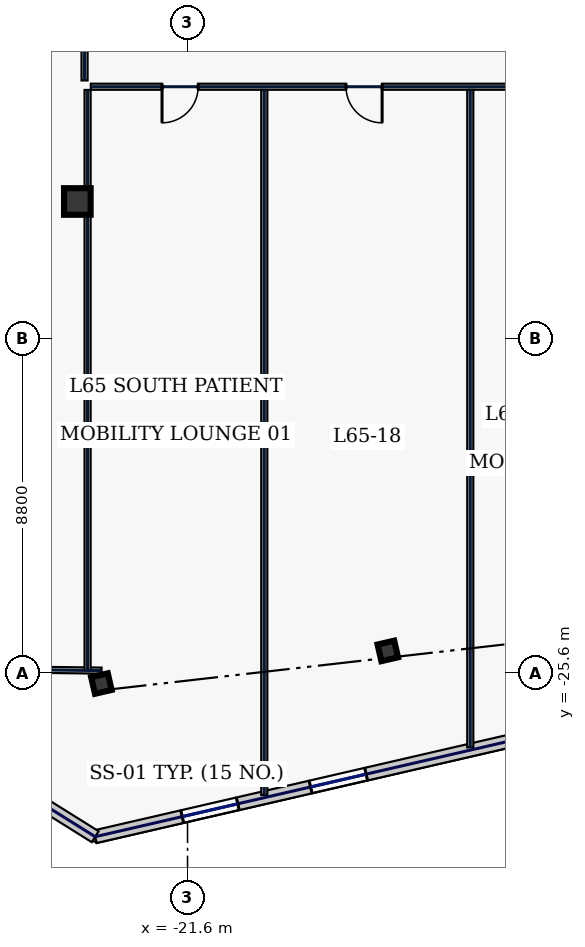
"""IFC4 building model, lengths in metres.
Left out: names, types, materials, properties, quantities, classifications, styles, units other than length and angle.
Written with IfcOpenShell. Run it as: python <this file> out.ifc"""

import sys

from ifc_helpers import new_model, si_unit, direction, frame, frame_2d, origin, origin_2d, place, context, subcontext, project, spatial, rectangle, hollow_rectangle, extrude, element, fill, save


model = new_model("IFC4")
c1 = context("Model", 3, precision=1e-05, world=origin(), true_north=direction((0.0, 1.0)))
c2 = subcontext(c1, "Body", "Model", "MODEL_VIEW")
j1 = project(units=[si_unit("LENGTHUNIT", "METRE"), si_unit("PLANEANGLEUNIT", "RADIAN")], contexts=[c1])
p1 = place(None, origin())
s1 = spatial("IfcSite", under=j1, at=p1, CompositionType="ELEMENT")
p2 = place(p1, origin())
s2 = spatial("IfcBuilding", under=s1, at=p2, CompositionType="ELEMENT")
p3 = place(p2, frame((0.0, 0.0, 281.0)))
s3 = spatial("IfcBuildingStorey", under=s2, at=p3, CompositionType="ELEMENT", Elevation=281.0)
p4 = place(p3, frame((-24.5, -13.2, 0.0), z_axis=(0.0, 0.0, 1.0), x_axis=(1.0, 0.0, 0.0)))
e1 = element("IfcColumn", 1, at=p4, inside=s3, PredefinedType="COLUMN", context=c2, shape_type="SweptSolid", body=[
    extrude(hollow_rectangle(XDim=0.7, YDim=0.7, WallThickness=0.032, at=origin_2d()), origin(), (0.0, 0.0, 1.0), 3.74),
])
for number, where, z_axis, x_axis in (
    (2, (-23.867, -25.886, 0.0), (0.0, 0.0, 1.0), (0.974, 0.225, 0.0)),
    (3, (-16.33, -25.027, 0.0), (0.0, 0.0, 1.0), (0.974, 0.225, 0.0)),
):
    element("IfcColumn", number, at=place(p3, frame(where, z_axis=z_axis, x_axis=x_axis)), inside=s3, PredefinedType="COLUMN", context=c2, shape_type="SweptSolid", body=[
        extrude(hollow_rectangle(XDim=0.45, YDim=0.45, WallThickness=0.022, at=origin_2d()), origin(), (0.0, 0.0, 1.0), 3.74),
    ])
p5 = place(p3, frame((-24.03, -29.916, 0.0), z_axis=(0.0, 0.0, 1.0), x_axis=(0.974371201193, 0.224946131964, 0.0)))
e4 = element("IfcWall", 4, at=p5, inside=s3, PredefinedType="STANDARD", context=c2, shape_type="SweptSolid", body=[
    extrude(rectangle(XDim=12.35, YDim=0.34, at=frame_2d((6.175, 0.0))), origin(), (0.0, 0.0, 1.0), 3.74),
])
p6 = place(p5, frame((2.35, 0.0, 0.9)))
e5 = element("IfcOpeningElement", 5, at=p6, cuts=e4, PredefinedType="OPENING", context=c2, shape_type="SweptSolid", body=[
    extrude(rectangle(XDim=1.5, YDim=2.0, at=frame_2d((0.75, 1.0))), frame((0.0, 0.18, 0.0), z_axis=(0.0, -1.0, 0.0), x_axis=(1.0, 0.0, 0.0)), (0.0, 0.0, 1.0), 0.36),
])
p7 = place(p5, frame((5.817, 0.0, 0.9)))
e6 = element("IfcOpeningElement", 6, at=p7, cuts=e4, PredefinedType="OPENING", context=c2, shape_type="SweptSolid", body=[
    extrude(rectangle(XDim=1.5, YDim=2.0, at=frame_2d((0.75, 1.0))), frame((0.0, 0.18, 0.0), z_axis=(0.0, -1.0, 0.0), x_axis=(1.0, 0.0, 0.0)), (0.0, 0.0, 1.0), 0.36),
])
p8 = place(p3, frame((-29.343, -26.596, 0.0), z_axis=(0.0, 0.0, 1.0), x_axis=(0.848037708252, -0.529935887993, 0.0)))
e7 = element("IfcWall", 7, at=p8, inside=s3, PredefinedType="STANDARD", context=c2, shape_type="SweptSolid", body=[
    extrude(rectangle(XDim=6.265, YDim=0.34, at=frame_2d((3.133, 0.0))), origin(), (0.0, 0.0, 1.0), 3.74),
])
p9 = place(p3, frame((-28.994, -25.479, 0.0), z_axis=(0.0, 0.0, 1.0), x_axis=(0.999915052546, -0.01303409726, 0.0)))
e8 = element("IfcWall", 8, at=p9, inside=s3, PredefinedType="PARTITIONING", context=c2, shape_type="SweptSolid", body=[
    extrude(rectangle(XDim=5.132, YDim=0.16, at=frame_2d((2.566, 0.0))), origin(), (0.0, 0.0, 1.0), 3.74),
])
p10 = place(p3, frame((-24.31, -10.015, 0.0), z_axis=(0.0, 0.0, 1.0), x_axis=(0.0, 1.0, 0.0)))
e9 = element("IfcWall", 9, at=p10, inside=s3, PredefinedType="PARTITIONING", context=c2, shape_type="SweptSolid", body=[
    extrude(rectangle(XDim=20.13, YDim=0.16, at=frame_2d((10.065, 0.0))), origin(), (0.0, 0.0, 1.0), 3.74),
])
p11 = place(p10, frame((2.169, 0.0, 0.0)))
e10 = element("IfcOpeningElement", 10, at=p11, cuts=e9, PredefinedType="OPENING", context=c2, shape_type="SweptSolid", body=[
    extrude(rectangle(XDim=0.95, YDim=2.2, at=frame_2d((0.475, 1.1))), frame((0.0, 0.09, 0.0), z_axis=(0.0, -1.0, 0.0), x_axis=(1.0, 0.0, 0.0)), (0.0, 0.0, 1.0), 0.18),
])
p12 = place(p10, frame((6.4, 0.0, 0.0)))
e11 = element("IfcOpeningElement", 11, at=p12, cuts=e9, PredefinedType="OPENING", context=c2, shape_type="SweptSolid", body=[
    extrude(rectangle(XDim=0.95, YDim=2.2, at=frame_2d((0.475, 1.1))), frame((0.0, 0.09, 0.0), z_axis=(0.0, -1.0, 0.0), x_axis=(1.0, 0.0, 0.0)), (0.0, 0.0, 1.0), 0.18),
])
p13 = place(p10, frame((11.6, 0.0, 0.0)))
e12 = element("IfcOpeningElement", 12, at=p13, cuts=e9, PredefinedType="OPENING", context=c2, shape_type="SweptSolid", body=[
    extrude(rectangle(XDim=0.95, YDim=2.2, at=frame_2d((0.475, 1.1))), frame((0.0, 0.09, 0.0), z_axis=(0.0, -1.0, 0.0), x_axis=(1.0, 0.0, 0.0)), (0.0, 0.0, 1.0), 0.18),
])
p14 = place(p10, frame((17.131, 0.0, 0.0)))
e13 = element("IfcOpeningElement", 13, at=p14, cuts=e9, PredefinedType="OPENING", context=c2, shape_type="SweptSolid", body=[
    extrude(rectangle(XDim=0.95, YDim=2.2, at=frame_2d((0.475, 1.1))), frame((0.0, 0.09, 0.0), z_axis=(0.0, -1.0, 0.0), x_axis=(1.0, 0.0, 0.0)), (0.0, 0.0, 1.0), 0.18),
])
p15 = place(p3, frame((12.535, -10.18, 0.0), z_axis=(0.0, 0.0, 1.0), x_axis=(-1.0, 0.0, 0.0)))
e14 = element("IfcWall", 14, at=p15, inside=s3, PredefinedType="PARTITIONING", context=c2, shape_type="SweptSolid", body=[
    extrude(rectangle(XDim=36.68, YDim=0.16, at=frame_2d((18.34, 0.0))), origin(), (0.0, 0.0, 1.0), 3.74),
])
p16 = place(p15, frame((33.856, 0.0, 0.0)))
e15 = element("IfcOpeningElement", 15, at=p16, cuts=e14, PredefinedType="OPENING", context=c2, shape_type="SweptSolid", body=[
    extrude(rectangle(XDim=0.95, YDim=2.2, at=frame_2d((0.475, 1.1))), frame((0.0, 0.09, 0.0), z_axis=(0.0, -1.0, 0.0), x_axis=(1.0, 0.0, 0.0)), (0.0, 0.0, 1.0), 0.18),
])
p17 = place(p15, frame((29.015, 0.0, 0.0)))
e16 = element("IfcOpeningElement", 16, at=p17, cuts=e14, PredefinedType="OPENING", context=c2, shape_type="SweptSolid", body=[
    extrude(rectangle(XDim=0.95, YDim=2.2, at=frame_2d((0.475, 1.1))), frame((0.0, 0.09, 0.0), z_axis=(0.0, -1.0, 0.0), x_axis=(1.0, 0.0, 0.0)), (0.0, 0.0, 1.0), 0.18),
])
p18 = place(p15, frame((23.83, 0.0, 0.0)))
e17 = element("IfcOpeningElement", 17, at=p18, cuts=e14, PredefinedType="OPENING", context=c2, shape_type="SweptSolid", body=[
    extrude(rectangle(XDim=0.95, YDim=2.2, at=frame_2d((0.475, 1.1))), frame((0.0, 0.09, 0.0), z_axis=(0.0, -1.0, 0.0), x_axis=(1.0, 0.0, 0.0)), (0.0, 0.0, 1.0), 0.18),
])
p19 = place(p15, frame((17.751, 0.0, 0.0)))
e18 = element("IfcOpeningElement", 18, at=p19, cuts=e14, PredefinedType="OPENING", context=c2, shape_type="SweptSolid", body=[
    extrude(rectangle(XDim=1.15, YDim=2.2, at=frame_2d((0.575, 1.1))), frame((0.0, 0.09, 0.0), z_axis=(0.0, -1.0, 0.0), x_axis=(1.0, 0.0, 0.0)), (0.0, 0.0, 1.0), 0.18),
])
p20 = place(p15, frame((12.426, 0.0, 0.0)))
e19 = element("IfcOpeningElement", 19, at=p20, cuts=e14, PredefinedType="OPENING", context=c2, shape_type="SweptSolid", body=[
    extrude(rectangle(XDim=1.05, YDim=2.2, at=frame_2d((0.525, 1.1))), frame((0.0, 0.09, 0.0), z_axis=(0.0, -1.0, 0.0), x_axis=(1.0, 0.0, 0.0)), (0.0, 0.0, 1.0), 0.18),
])
p21 = place(p15, frame((5.545, 0.0, 0.0)))
e20 = element("IfcOpeningElement", 20, at=p21, cuts=e14, PredefinedType="OPENING", context=c2, shape_type="SweptSolid", body=[
    extrude(rectangle(XDim=0.95, YDim=2.2, at=frame_2d((0.475, 1.1))), frame((0.0, 0.09, 0.0), z_axis=(0.0, -1.0, 0.0), x_axis=(1.0, 0.0, 0.0)), (0.0, 0.0, 1.0), 0.18),
])
p22 = place(p3, frame((-24.23, -25.536, 0.0), z_axis=(0.0, 0.0, 1.0), x_axis=(0.0, 1.0, 0.0)))
e21 = element("IfcWall", 21, at=p22, inside=s3, PredefinedType="PARTITIONING", context=c2, shape_type="SweptSolid", body=[
    extrude(rectangle(XDim=15.271, YDim=0.16, at=frame_2d((7.635, 0.0))), origin(), (0.0, 0.0, 1.0), 2.135),
])
p23 = place(p3, frame((-19.58, -28.817, 0.0), z_axis=(0.0, 0.0, 1.0), x_axis=(0.0, 1.0, 0.0)))
e22 = element("IfcWall", 22, at=p23, inside=s3, PredefinedType="PARTITIONING", context=c2, shape_type="SweptSolid", body=[
    extrude(rectangle(XDim=18.552, YDim=0.16, at=frame_2d((9.276, 0.0))), origin(), (0.0, 0.0, 1.0), 3.74),
])
p24 = place(p3, frame((-14.16, -27.566, 0.0), z_axis=(0.0, 0.0, 1.0), x_axis=(0.0, 1.0, 0.0)))
e23 = element("IfcWall", 23, at=p24, inside=s3, PredefinedType="PARTITIONING", context=c2, shape_type="SweptSolid", body=[
    extrude(rectangle(XDim=17.301, YDim=0.16, at=frame_2d((8.65, 0.0))), origin(), (0.0, 0.0, 1.0), 3.74),
])
p25 = place(p6, origin())
e24 = element("IfcWindow", 24, at=p25, inside=s3, PartitioningType="SINGLE_PANEL", PredefinedType="WINDOW", context=c2, shape_type="SweptSolid", body=[
    extrude(rectangle(XDim=1.5, YDim=2.0, at=frame_2d((0.75, 1.0))), frame((0.0, 0.03, 0.0), z_axis=(0.0, -1.0, 0.0), x_axis=(1.0, 0.0, 0.0)), (0.0, 0.0, 1.0), 0.06),
])
fill(e5, e24)
p26 = place(p7, origin())
e25 = element("IfcWindow", 25, at=p26, inside=s3, PartitioningType="SINGLE_PANEL", PredefinedType="WINDOW", context=c2, shape_type="SweptSolid", body=[
    extrude(rectangle(XDim=1.5, YDim=2.0, at=frame_2d((0.75, 1.0))), frame((0.0, 0.03, 0.0), z_axis=(0.0, -1.0, 0.0), x_axis=(1.0, 0.0, 0.0)), (0.0, 0.0, 1.0), 0.06),
])
fill(e6, e25)
p27 = place(p16, origin())
e26 = element("IfcDoor", 26, at=p27, inside=s3, OperationType="SINGLE_SWING_RIGHT", PredefinedType="DOOR", context=c2, shape_type="SweptSolid", body=[
    extrude(rectangle(XDim=0.95, YDim=2.2, at=frame_2d((0.475, 1.1))), frame((0.0, 0.025, 0.0), z_axis=(0.0, -1.0, 0.0), x_axis=(1.0, 0.0, 0.0)), (0.0, 0.0, 1.0), 0.05),
])
fill(e15, e26)
p28 = place(p17, origin())
e27 = element("IfcDoor", 27, at=p28, inside=s3, OperationType="SINGLE_SWING_LEFT", PredefinedType="DOOR", context=c2, shape_type="SweptSolid", body=[
    extrude(rectangle(XDim=0.95, YDim=2.2, at=frame_2d((0.475, 1.1))), frame((0.0, 0.025, 0.0), z_axis=(0.0, -1.0, 0.0), x_axis=(1.0, 0.0, 0.0)), (0.0, 0.0, 1.0), 0.05),
])
fill(e16, e27)
save(model, sys.argv[1])
